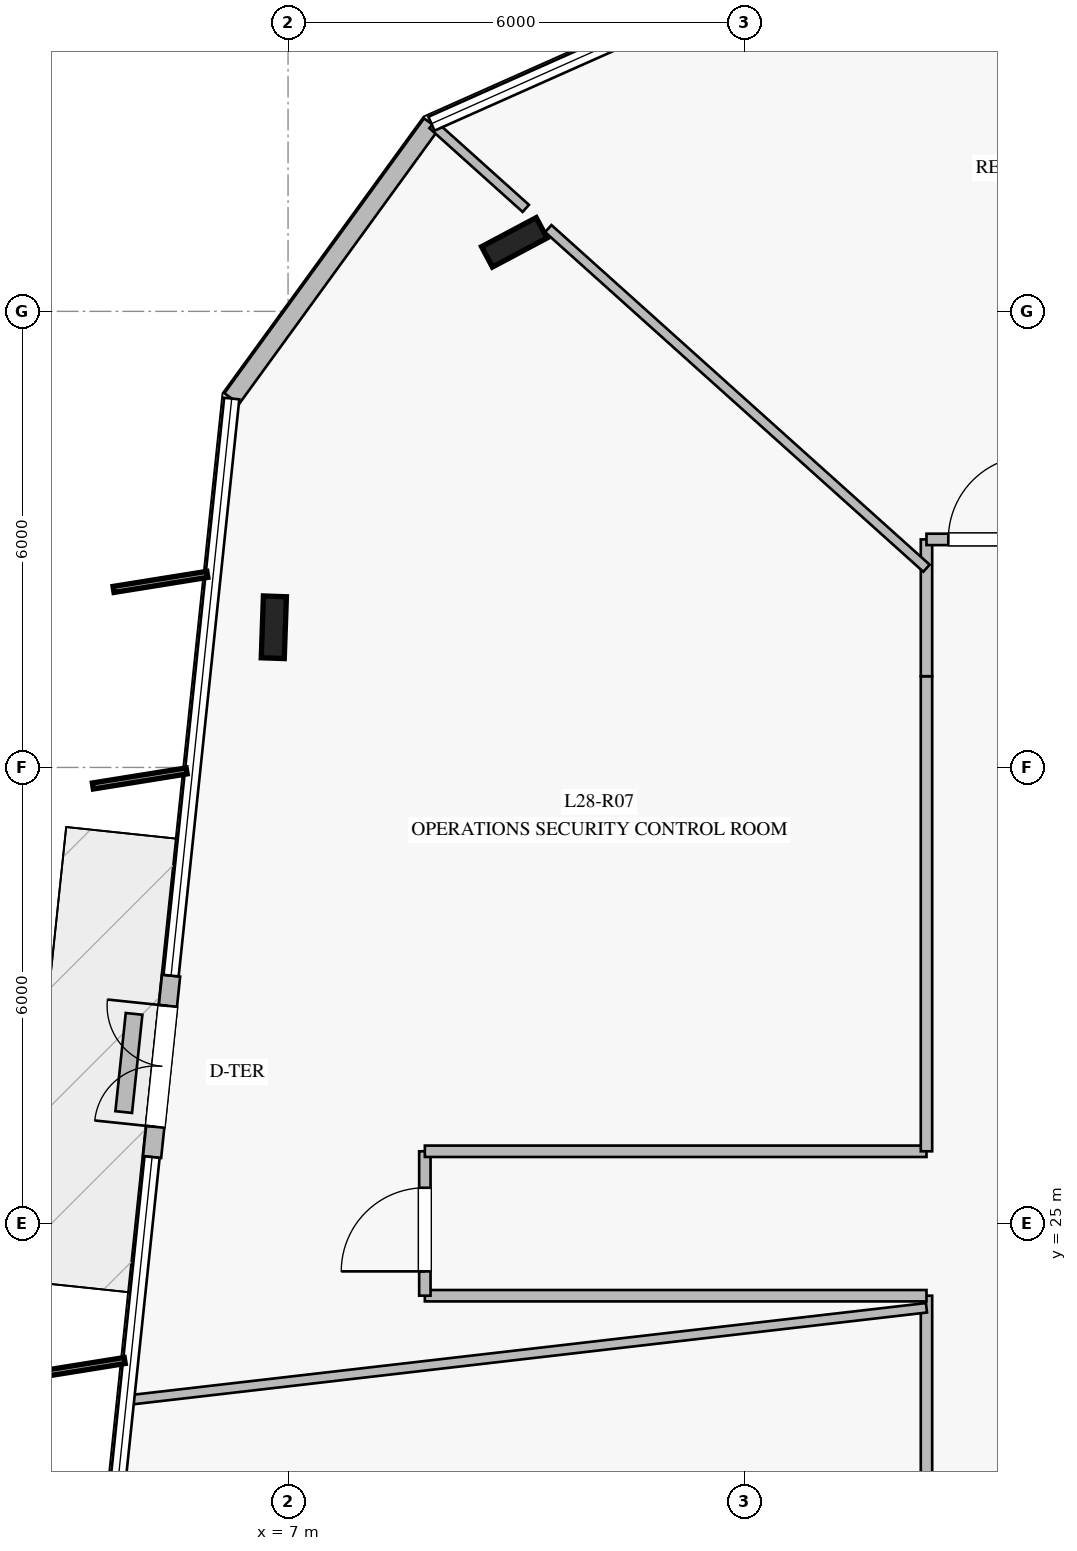
"""IFC4 building model, lengths in metres.
Left out: names, types, materials, properties, quantities, classifications, styles, units other than length and angle.
Written with IfcOpenShell. Run it as: python <this file> out.ifc"""

import sys

from ifc_helpers import new_model, si_unit, direction, frame, frame_2d, origin, origin_2d, place, context, subcontext, project, spatial, rectangle, i_section, extrude, element, fill, save


model = new_model("IFC4")
c1 = context("Model", 3, precision=1e-05, world=origin(), true_north=direction((0.0, 1.0)))
c2 = subcontext(c1, "Body", "Model", "MODEL_VIEW")
j1 = project(units=[si_unit("LENGTHUNIT", "METRE"), si_unit("PLANEANGLEUNIT", "RADIAN")], contexts=[c1])
p1 = place(None, origin())
s1 = spatial("IfcSite", under=j1, at=p1, CompositionType="ELEMENT")
p2 = place(p1, origin())
s2 = spatial("IfcBuilding", under=s1, at=p2, CompositionType="ELEMENT")
p3 = place(p2, frame((0.0, 0.0, 118.4)))
s3 = spatial("IfcBuildingStorey", under=s2, at=p3, CompositionType="ELEMENT", Elevation=118.4)
for number, where, z_axis, x_axis in (
    (1, (9.977, 37.908, 0.0), (0.0, 0.0, 1.0), (0.883, 0.469, 0.0)),
    (2, (6.813, 32.844, 0.0), (0.0, 0.0, 1.0), (0.035, 0.999, 0.0)),
):
    element("IfcColumn", number, at=place(p3, frame(where, z_axis=z_axis, x_axis=x_axis)), inside=s3, PredefinedType="COLUMN", context=c2, shape_type="SweptSolid", body=[
        extrude(i_section(OverallWidth=0.303, OverallDepth=0.814, WebThickness=0.021, FlangeThickness=0.04, at=origin_2d()), origin(), (0.0, 0.0, 1.0), 4.0),
    ])
p4 = place(p3, frame((8.887, 39.469, 0.0), z_axis=(0.0, 0.0, 1.0), x_axis=(-0.587898873753, -0.80893443136, 0.0)))
e3 = element("IfcWall", 3, at=p4, inside=s3, PredefinedType="STANDARD", context=c2, shape_type="SweptSolid", body=[
    extrude(rectangle(XDim=4.47, YDim=0.24, at=frame_2d((2.235, 0.0))), origin(), (0.0, 0.0, 1.0), 3.76),
])
p5 = place(p3, frame((5.461, 28.261, 0.0), z_axis=(0.0, 0.0, 1.0), x_axis=(-0.104165836226, -0.994559942167, 0.0)))
e4 = element("IfcWall", 4, at=p5, inside=s3, PredefinedType="STANDARD", context=c2, shape_type="SweptSolid", body=[
    extrude(rectangle(XDim=2.4, YDim=0.24, at=frame_2d((1.2, 0.0))), origin(), (0.0, 0.0, 1.0), 3.76),
])
p6 = place(p5, frame((0.4, 0.0, 0.0)))
e5 = element("IfcOpeningElement", 5, at=p6, cuts=e4, PredefinedType="OPENING", context=c2, shape_type="SweptSolid", body=[
    extrude(rectangle(XDim=1.6, YDim=2.25, at=frame_2d((0.8, 1.125))), frame((0.0, 0.13, 0.0), z_axis=(0.0, -1.0, 0.0), x_axis=(1.0, 0.0, 0.0)), (0.0, 0.0, 1.0), 0.26),
])
p7 = place(p3, frame((4.974, 27.758, 0.0), z_axis=(0.0, 0.0, 1.0), x_axis=(-0.104860863868, -0.994486902492, 0.0)))
e6 = element("IfcWall", 6, at=p7, inside=s3, PredefinedType="USERDEFINED", context=c2, shape_type="SweptSolid", body=[
    extrude(rectangle(XDim=1.299, YDim=0.22, at=frame_2d((0.649, 0.0))), origin(), (0.0, 0.0, 1.0), 0.4),
])
p8 = place(p3, frame((15.4, 17.8, 0.0), z_axis=(0.0, 0.0, 1.0), x_axis=(0.0, 1.0, 0.0)))
e7 = element("IfcWall", 7, at=p8, inside=s3, PredefinedType="PARTITIONING", context=c2, shape_type="SweptSolid", body=[
    extrude(rectangle(XDim=6.25, YDim=0.15, at=frame_2d((3.125, 0.0))), origin(), (0.0, 0.0, 1.0), 3.21),
])
p9 = place(p3, frame((15.4, 24.05, 0.0), z_axis=(0.0, 0.0, 1.0), x_axis=(-1.0, 0.0, 0.0)))
e8 = element("IfcWall", 8, at=p9, inside=s3, PredefinedType="PARTITIONING", context=c2, shape_type="SweptSolid", body=[
    extrude(rectangle(XDim=6.6, YDim=0.15, at=frame_2d((3.3, 0.0))), origin(), (0.0, 0.0, 1.0), 3.36),
])
p10 = place(p3, frame((8.8, 24.05, 0.0), z_axis=(0.0, 0.0, 1.0), x_axis=(0.0, 1.0, 0.0)))
e9 = element("IfcWall", 9, at=p10, inside=s3, PredefinedType="PARTITIONING", context=c2, shape_type="SweptSolid", body=[
    extrude(rectangle(XDim=1.9, YDim=0.15, at=frame_2d((0.95, 0.0))), origin(), (0.0, 0.0, 1.0), 3.76),
])
p11 = place(p10, frame((0.32, 0.0, 0.0)))
e10 = element("IfcOpeningElement", 10, at=p11, cuts=e9, PredefinedType="OPENING", context=c2, shape_type="SweptSolid", body=[
    extrude(rectangle(XDim=1.1, YDim=2.2, at=frame_2d((0.55, 1.1))), frame((0.0, 0.085, 0.0), z_axis=(0.0, -1.0, 0.0), x_axis=(1.0, 0.0, 0.0)), (0.0, 0.0, 1.0), 0.17),
])
p12 = place(p3, frame((8.8, 25.95, 0.0), z_axis=(0.0, 0.0, 1.0), x_axis=(1.0, 0.0, 0.0)))
e11 = element("IfcWall", 11, at=p12, inside=s3, PredefinedType="PARTITIONING", context=c2, shape_type="SweptSolid", body=[
    extrude(rectangle(XDim=6.6, YDim=0.15, at=frame_2d((3.3, 0.0))), origin(), (0.0, 0.0, 1.0), 3.36),
])
p13 = place(p3, frame((15.4, 25.95, 0.0), z_axis=(0.0, 0.0, 1.0), x_axis=(0.0, 1.0, 0.0)))
e12 = element("IfcWall", 12, at=p13, inside=s3, PredefinedType="PARTITIONING", context=c2, shape_type="SweptSolid", body=[
    extrude(rectangle(XDim=6.25, YDim=0.15, at=frame_2d((3.125, 0.0))), origin(), (0.0, 0.0, 1.0), 3.21),
])
p14 = place(p3, frame((15.4, 32.2, 0.0), z_axis=(0.0, 0.0, 1.0), x_axis=(0.0, 1.0, 0.0)))
e13 = element("IfcWall", 13, at=p14, inside=s3, PredefinedType="PARTITIONING", context=c2, shape_type="SweptSolid", body=[
    extrude(rectangle(XDim=1.8, YDim=0.15, at=frame_2d((0.9, 0.0))), origin(), (0.0, 0.0, 1.0), 3.21),
])
p15 = place(p3, frame((15.4, 34.0, 0.0), z_axis=(0.0, 0.0, 1.0), x_axis=(1.0, 0.0, 0.0)))
e14 = element("IfcWall", 14, at=p15, inside=s3, PredefinedType="PARTITIONING", context=c2, shape_type="SweptSolid", body=[
    extrude(rectangle(XDim=1.8, YDim=0.15, at=frame_2d((0.9, 0.0))), origin(), (0.0, 0.0, 1.0), 3.76),
])
p16 = place(p15, frame((0.287, 0.0, 0.0)))
e15 = element("IfcOpeningElement", 15, at=p16, cuts=e14, PredefinedType="OPENING", context=c2, shape_type="SweptSolid", body=[
    extrude(rectangle(XDim=1.1, YDim=2.2, at=frame_2d((0.55, 1.1))), frame((0.0, 0.085, 0.0), z_axis=(0.0, -1.0, 0.0), x_axis=(1.0, 0.0, 0.0)), (0.0, 0.0, 1.0), 0.17),
])
p17 = place(p3, frame((15.4, 33.621, 0.0), z_axis=(0.0, 0.0, 1.0), x_axis=(-0.744054267137, 0.668119186639, 0.0)))
e16 = element("IfcWall", 16, at=p17, inside=s3, PredefinedType="PARTITIONING", context=c2, shape_type="SweptSolid", body=[
    extrude(rectangle(XDim=6.688, YDim=0.125, at=frame_2d((3.344, 0.0))), origin(), (0.0, 0.0, 1.0), 3.16),
])
p18 = place(p3, frame((10.128, 38.355, 0.0), z_axis=(0.0, 0.0, 1.0), x_axis=(-0.743985633598, 0.668195612826, 0.0)))
e17 = element("IfcWall", 17, at=p18, inside=s3, PredefinedType="PARTITIONING", context=c2, shape_type="SweptSolid", body=[
    extrude(rectangle(XDim=1.649, YDim=0.125, at=frame_2d((0.825, 0.0))), origin(), (0.0, 0.0, 1.0), 3.76),
])
p19 = place(p3, frame((15.4, 23.891, 0.0), z_axis=(0.0, 0.0, 1.0), x_axis=(-0.993380400017, -0.114871148952, 0.0)))
e18 = element("IfcWall", 18, at=p19, inside=s3, PredefinedType="PARTITIONING", context=c2, shape_type="SweptSolid", body=[
    extrude(rectangle(XDim=10.578, YDim=0.125, at=frame_2d((5.289, 0.0))), origin(), (0.0, 0.0, 1.0), 3.16),
])
p20 = place(p6, frame((1.6, 0.0, 0.0), z_axis=(0.0, 0.0, 1.0), x_axis=(-1.0, 0.0, 0.0)))
e19 = element("IfcDoor", 19, at=p20, inside=s3, OperationType="DOUBLE_DOOR_SINGLE_SWING", PredefinedType="DOOR", context=c2, shape_type="SweptSolid", body=[
    extrude(rectangle(XDim=1.6, YDim=2.25, at=frame_2d((0.8, 1.125))), frame((0.0, 0.025, 0.0), z_axis=(0.0, -1.0, 0.0), x_axis=(1.0, 0.0, 0.0)), (0.0, 0.0, 1.0), 0.05),
])
fill(e5, e19)
p21 = place(p16, origin())
e20 = element("IfcDoor", 20, at=p21, inside=s3, OperationType="SINGLE_SWING_RIGHT", PredefinedType="DOOR", context=c2, shape_type="SweptSolid", body=[
    extrude(rectangle(XDim=1.1, YDim=2.2, at=frame_2d((0.55, 1.1))), frame((0.0, 0.025, 0.0), z_axis=(0.0, -1.0, 0.0), x_axis=(1.0, 0.0, 0.0)), (0.0, 0.0, 1.0), 0.05),
])
fill(e15, e20)
p22 = place(p11, origin())
e21 = element("IfcDoor", 21, at=p22, inside=s3, OperationType="SINGLE_SWING_LEFT", PredefinedType="DOOR", context=c2, shape_type="SweptSolid", body=[
    extrude(rectangle(XDim=1.1, YDim=2.2, at=frame_2d((0.55, 1.1))), frame((0.0, 0.025, 0.0), z_axis=(0.0, -1.0, 0.0), x_axis=(1.0, 0.0, 0.0)), (0.0, 0.0, 1.0), 0.05),
])
fill(e10, e21)
save(model, sys.argv[1])
